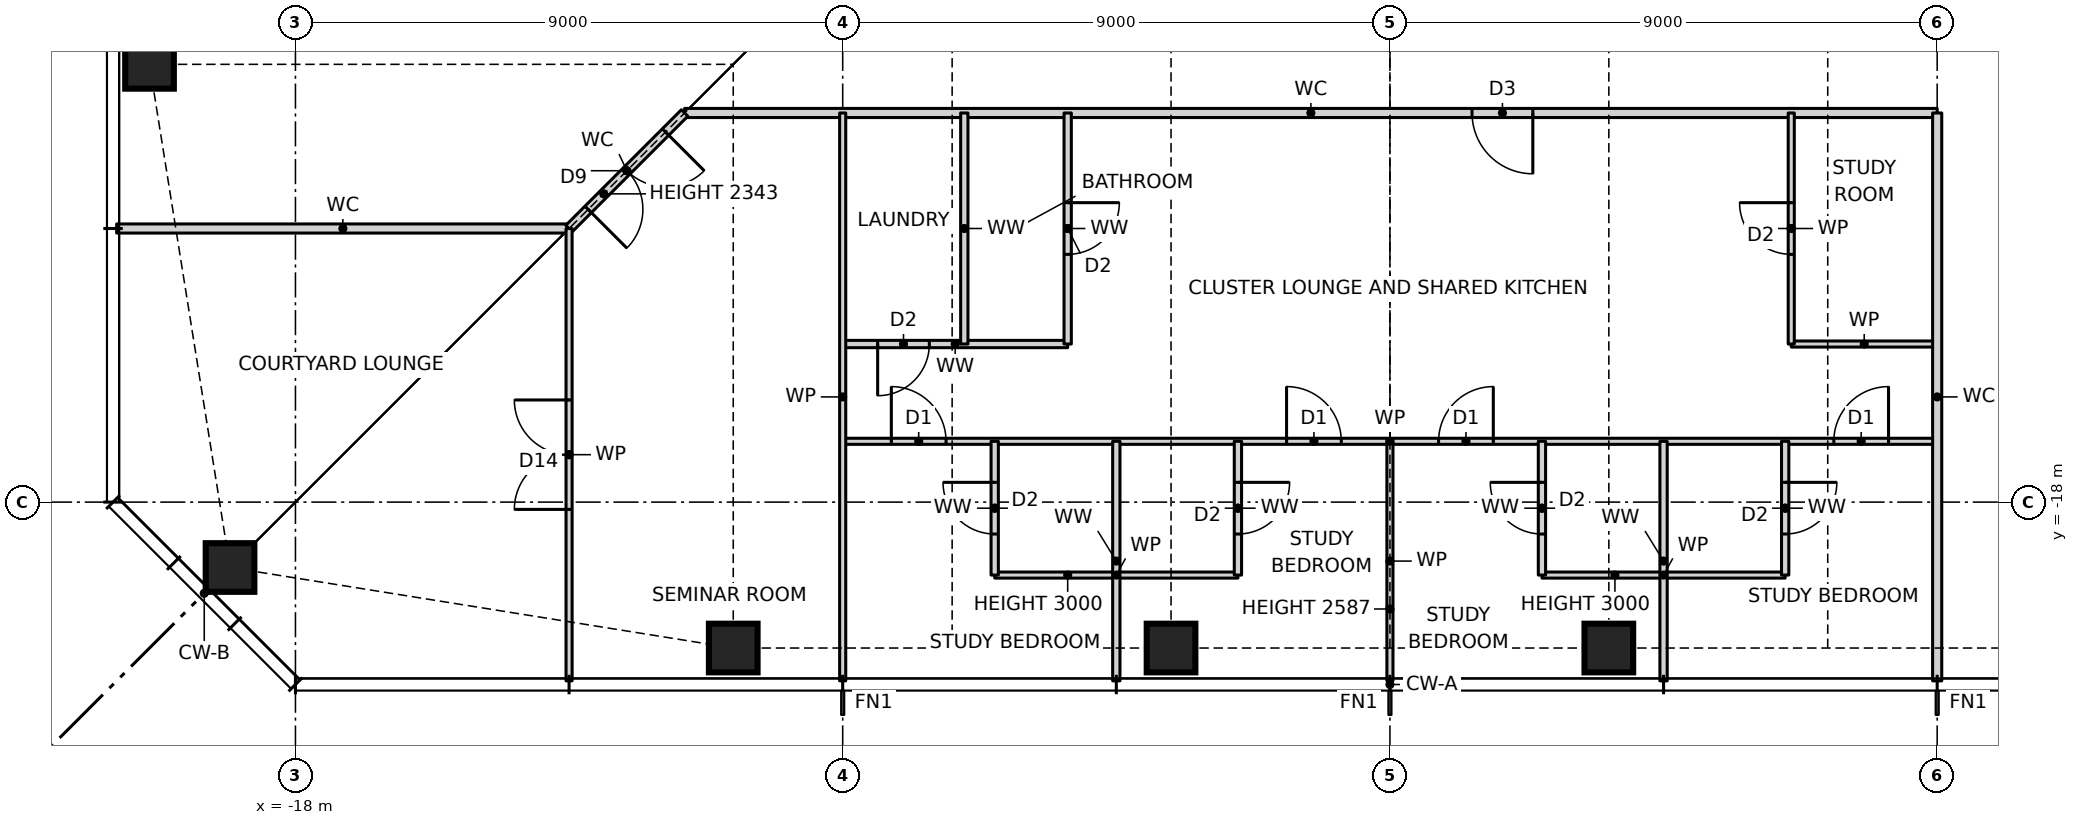
"""IFC4 building model, lengths in metres.
Left out: names, types, materials, properties, quantities, classifications, styles, units other than length and angle.
Written with IfcOpenShell. Run it as: python <this file> out.ifc"""

import sys

from ifc_helpers import new_model, si_unit, direction, frame, frame_2d, origin, origin_2d, place, context, subcontext, project, spatial, rectangle, hollow_rectangle, extrude, element, fill, save


model = new_model("IFC4")
c1 = context("Model", 3, precision=1e-05, world=origin(), true_north=direction((0.0, 1.0)))
c2 = subcontext(c1, "Body", "Model", "MODEL_VIEW")
j1 = project(units=[si_unit("LENGTHUNIT", "METRE"), si_unit("PLANEANGLEUNIT", "RADIAN")], contexts=[c1])
p1 = place(None, origin())
s1 = spatial("IfcSite", under=j1, at=p1, CompositionType="ELEMENT")
p2 = place(p1, origin())
s2 = spatial("IfcBuilding", under=s1, at=p2, CompositionType="ELEMENT")
p3 = place(p2, frame((0.0, 0.0, 98.0)))
s3 = spatial("IfcBuildingStorey", under=s2, at=p3, CompositionType="ELEMENT", Elevation=98.0)
for number, where, z_axis, x_axis in (
    (1, (-19.076, -19.076, 0.0), (0.0, 0.0, 1.0), (1.0, 0.0, 0.0)),
    (2, (-10.8, -20.4, 0.0), (0.0, 0.0, 1.0), (1.0, 0.0, 0.0)),
    (3, (-3.6, -20.4, 0.0), (0.0, 0.0, 1.0), (1.0, 0.0, 0.0)),
    (4, (3.6, -20.4, 0.0), (0.0, 0.0, 1.0), (1.0, 0.0, 0.0)),
    (5, (-20.4, -10.8, 0.0), (0.0, 0.0, 1.0), (1.0, 0.0, 0.0)),
):
    element("IfcColumn", number, at=place(p3, frame(where, z_axis=z_axis, x_axis=x_axis)), inside=s3, PredefinedType="COLUMN", context=c2, shape_type="SweptSolid", body=[
        extrude(hollow_rectangle(XDim=0.8, YDim=0.8, WallThickness=0.07, at=origin_2d()), origin(), (0.0, 0.0, 1.0), 3.5),
    ])
for number, where, z_axis, x_axis in (
    (6, (-6.5, -19.2, 0.0), (0.0, 0.0, 1.0), (1.0, 0.0, 0.0)),
    (7, (2.5, -19.2, 0.0), (0.0, 0.0, 1.0), (1.0, 0.0, 0.0)),
):
    element("IfcWall", number, at=place(p3, frame(where, z_axis=z_axis, x_axis=x_axis)), inside=s3, PredefinedType="PARTITIONING", context=c2, shape_type="SweptSolid", body=[
        extrude(rectangle(XDim=4.0, YDim=0.1, at=frame_2d((2.0, 0.0))), origin(), (0.0, 0.0, 1.0), 3.0),
    ])
p4 = place(p3, frame((-9.0, -17.0, 0.0), z_axis=(0.0, 0.0, 1.0), x_axis=(1.0, 0.0, 0.0)))
e8 = element("IfcWall", 8, at=p4, inside=s3, PredefinedType="PARTITIONING", context=c2, shape_type="SweptSolid", body=[
    extrude(rectangle(XDim=18.0, YDim=0.1, at=frame_2d((9.0, 0.0))), origin(), (0.0, 0.0, 1.0), 3.27),
])
p5 = place(p4, frame((0.8, 0.0, 0.0)))
e9 = element("IfcOpeningElement", 9, at=p5, cuts=e8, PredefinedType="OPENING", context=c2, shape_type="SweptSolid", body=[
    extrude(rectangle(XDim=0.9, YDim=2.1, at=frame_2d((0.45, 1.05))), frame((0.0, 0.06, 0.0), z_axis=(0.0, -1.0, 0.0), x_axis=(1.0, 0.0, 0.0)), (0.0, 0.0, 1.0), 0.12),
])
p6 = place(p4, frame((7.3, 0.0, 0.0)))
e10 = element("IfcOpeningElement", 10, at=p6, cuts=e8, PredefinedType="OPENING", context=c2, shape_type="SweptSolid", body=[
    extrude(rectangle(XDim=0.9, YDim=2.1, at=frame_2d((0.45, 1.05))), frame((0.0, 0.06, 0.0), z_axis=(0.0, -1.0, 0.0), x_axis=(1.0, 0.0, 0.0)), (0.0, 0.0, 1.0), 0.12),
])
p7 = place(p4, frame((9.8, 0.0, 0.0)))
e11 = element("IfcOpeningElement", 11, at=p7, cuts=e8, PredefinedType="OPENING", context=c2, shape_type="SweptSolid", body=[
    extrude(rectangle(XDim=0.9, YDim=2.1, at=frame_2d((0.45, 1.05))), frame((0.0, 0.06, 0.0), z_axis=(0.0, -1.0, 0.0), x_axis=(1.0, 0.0, 0.0)), (0.0, 0.0, 1.0), 0.12),
])
p8 = place(p4, frame((16.3, 0.0, 0.0)))
e12 = element("IfcOpeningElement", 12, at=p8, cuts=e8, PredefinedType="OPENING", context=c2, shape_type="SweptSolid", body=[
    extrude(rectangle(XDim=0.9, YDim=2.1, at=frame_2d((0.45, 1.05))), frame((0.0, 0.06, 0.0), z_axis=(0.0, -1.0, 0.0), x_axis=(1.0, 0.0, 0.0)), (0.0, 0.0, 1.0), 0.12),
])
p9 = place(p3, frame((-9.0, -15.4, 0.0), z_axis=(0.0, 0.0, 1.0), x_axis=(1.0, 0.0, 0.0)))
e13 = element("IfcWall", 13, at=p9, inside=s3, PredefinedType="PARTITIONING", context=c2, shape_type="SweptSolid", body=[
    extrude(rectangle(XDim=3.7, YDim=0.12, at=frame_2d((1.85, 0.0))), origin(), (0.0, 0.0, 1.0), 3.27),
])
p10 = place(p9, frame((0.575, 0.0, 0.0)))
e14 = element("IfcOpeningElement", 14, at=p10, cuts=e13, PredefinedType="OPENING", context=c2, shape_type="SweptSolid", body=[
    extrude(rectangle(XDim=0.85, YDim=2.1, at=frame_2d((0.425, 1.05))), frame((0.0, 0.07, 0.0), z_axis=(0.0, -1.0, 0.0), x_axis=(1.0, 0.0, 0.0)), (0.0, 0.0, 1.0), 0.14),
])
p11 = place(p3, frame((6.6, -15.4, 0.0), z_axis=(0.0, 0.0, 1.0), x_axis=(1.0, 0.0, 0.0)))
e15 = element("IfcWall", 15, at=p11, inside=s3, PredefinedType="PARTITIONING", context=c2, shape_type="SweptSolid", body=[
    extrude(rectangle(XDim=2.4, YDim=0.1, at=frame_2d((1.2, 0.0))), origin(), (0.0, 0.0, 1.0), 3.27),
])
p12 = place(p3, frame((-20.94, -13.5, 0.0), z_axis=(0.0, 0.0, 1.0), x_axis=(1.0, 0.0, 0.0)))
e16 = element("IfcWall", 16, at=p12, inside=s3, PredefinedType="PARTITIONING", context=c2, shape_type="SweptSolid", body=[
    extrude(rectangle(XDim=7.44, YDim=0.15, at=frame_2d((3.72, 0.0))), origin(), (0.0, 0.0, 1.0), 3.27),
])
p13 = place(p3, frame((-11.6, -11.6, 0.0), z_axis=(0.0, 0.0, 1.0), x_axis=(1.0, 0.0, 0.0)))
e17 = element("IfcWall", 17, at=p13, inside=s3, PredefinedType="PARTITIONING", context=c2, shape_type="SweptSolid", body=[
    extrude(rectangle(XDim=20.6, YDim=0.15, at=frame_2d((10.3, 0.0))), origin(), (0.0, 0.0, 1.0), 3.27),
])
p14 = place(p13, frame((12.95, 0.0, 0.0)))
e18 = element("IfcOpeningElement", 18, at=p14, cuts=e17, PredefinedType="OPENING", context=c2, shape_type="SweptSolid", body=[
    extrude(rectangle(XDim=1.0, YDim=2.1, at=frame_2d((0.5, 1.05))), frame((0.0, 0.085, 0.0), z_axis=(0.0, -1.0, 0.0), x_axis=(1.0, 0.0, 0.0)), (0.0, 0.0, 1.0), 0.17),
])
p15 = place(p3, frame((-13.5, -13.5, 0.0), z_axis=(0.0, 0.0, 1.0), x_axis=(0.707106781187, 0.707106781187, 0.0)))
e19 = element("IfcWall", 19, at=p15, inside=s3, PredefinedType="PARTITIONING", context=c2, shape_type="SweptSolid", body=[
    extrude(rectangle(XDim=2.687, YDim=0.15, at=frame_2d((1.343, 0.0))), origin(), (0.0, 0.0, 1.0), 2.343),
])
p16 = place(p15, frame((0.444, 0.0, 0.0)))
e20 = element("IfcOpeningElement", 20, at=p16, cuts=e19, PredefinedType="OPENING", context=c2, shape_type="SweptSolid", body=[
    extrude(rectangle(XDim=1.8, YDim=2.1, at=frame_2d((0.9, 1.05))), frame((0.0, 0.085, 0.0), z_axis=(0.0, -1.0, 0.0), x_axis=(1.0, 0.0, 0.0)), (0.0, 0.0, 1.0), 0.17),
])
p17 = place(p3, frame((9.0, -20.94, 0.0), z_axis=(0.0, 0.0, 1.0), x_axis=(0.0, 1.0, 0.0)))
e21 = element("IfcWall", 21, at=p17, inside=s3, PredefinedType="PARTITIONING", context=c2, shape_type="SweptSolid", body=[
    extrude(rectangle(XDim=9.34, YDim=0.15, at=frame_2d((4.67, 0.0))), origin(), (0.0, 0.0, 1.0), 3.27),
])
p18 = place(p3, frame((6.6, -15.4, 0.0), z_axis=(0.0, 0.0, 1.0), x_axis=(0.0, 1.0, 0.0)))
e22 = element("IfcWall", 22, at=p18, inside=s3, PredefinedType="PARTITIONING", context=c2, shape_type="SweptSolid", body=[
    extrude(rectangle(XDim=3.8, YDim=0.1, at=frame_2d((1.9, 0.0))), origin(), (0.0, 0.0, 1.0), 3.27),
])
p19 = place(p18, frame((1.475, 0.0, 0.0)))
e23 = element("IfcOpeningElement", 23, at=p19, cuts=e22, PredefinedType="OPENING", context=c2, shape_type="SweptSolid", body=[
    extrude(rectangle(XDim=0.85, YDim=2.1, at=frame_2d((0.425, 1.05))), frame((0.0, 0.06, 0.0), z_axis=(0.0, -1.0, 0.0), x_axis=(1.0, 0.0, 0.0)), (0.0, 0.0, 1.0), 0.12),
])
p20 = place(p3, frame((6.5, -19.2, 0.0), z_axis=(0.0, 0.0, 1.0), x_axis=(0.0, 1.0, 0.0)))
e24 = element("IfcWall", 24, at=p20, inside=s3, PredefinedType="PARTITIONING", context=c2, shape_type="SweptSolid", body=[
    extrude(rectangle(XDim=2.2, YDim=0.12, at=frame_2d((1.1, 0.0))), origin(), (0.0, 0.0, 1.0), 3.27),
])
p21 = place(p20, frame((0.675, 0.0, 0.0)))
e25 = element("IfcOpeningElement", 25, at=p21, cuts=e24, PredefinedType="OPENING", context=c2, shape_type="SweptSolid", body=[
    extrude(rectangle(XDim=0.85, YDim=2.1, at=frame_2d((0.425, 1.05))), frame((0.0, 0.07, 0.0), z_axis=(0.0, -1.0, 0.0), x_axis=(1.0, 0.0, 0.0)), (0.0, 0.0, 1.0), 0.14),
])
p22 = place(p3, frame((4.5, -20.94, 0.0), z_axis=(0.0, 0.0, 1.0), x_axis=(0.0, 1.0, 0.0)))
e26 = element("IfcWall", 26, at=p22, inside=s3, PredefinedType="PARTITIONING", context=c2, shape_type="SweptSolid", body=[
    extrude(rectangle(XDim=3.94, YDim=0.12, at=frame_2d((1.97, 0.0))), origin(), (0.0, 0.0, 1.0), 3.27),
])
p23 = place(p3, frame((2.5, -19.2, 0.0), z_axis=(0.0, 0.0, 1.0), x_axis=(0.0, 1.0, 0.0)))
e27 = element("IfcWall", 27, at=p23, inside=s3, PredefinedType="PARTITIONING", context=c2, shape_type="SweptSolid", body=[
    extrude(rectangle(XDim=2.2, YDim=0.12, at=frame_2d((1.1, 0.0))), origin(), (0.0, 0.0, 1.0), 3.27),
])
p24 = place(p23, frame((0.675, 0.0, 0.0)))
e28 = element("IfcOpeningElement", 28, at=p24, cuts=e27, PredefinedType="OPENING", context=c2, shape_type="SweptSolid", body=[
    extrude(rectangle(XDim=0.85, YDim=2.1, at=frame_2d((0.425, 1.05))), frame((0.0, 0.07, 0.0), z_axis=(0.0, -1.0, 0.0), x_axis=(1.0, 0.0, 0.0)), (0.0, 0.0, 1.0), 0.14),
])
p25 = place(p3, frame((0.0, -20.94, 0.0), z_axis=(0.0, 0.0, 1.0), x_axis=(0.0, 1.0, 0.0)))
e29 = element("IfcWall", 29, at=p25, inside=s3, PredefinedType="PARTITIONING", context=c2, shape_type="SweptSolid", body=[
    extrude(rectangle(XDim=3.94, YDim=0.1, at=frame_2d((1.97, 0.0))), origin(), (0.0, 0.0, 1.0), 2.587),
])
p26 = place(p3, frame((-2.5, -19.2, 0.0), z_axis=(0.0, 0.0, 1.0), x_axis=(0.0, 1.0, 0.0)))
e30 = element("IfcWall", 30, at=p26, inside=s3, PredefinedType="PARTITIONING", context=c2, shape_type="SweptSolid", body=[
    extrude(rectangle(XDim=2.2, YDim=0.12, at=frame_2d((1.1, 0.0))), origin(), (0.0, 0.0, 1.0), 3.27),
])
p27 = place(p26, frame((0.675, 0.0, 0.0)))
e31 = element("IfcOpeningElement", 31, at=p27, cuts=e30, PredefinedType="OPENING", context=c2, shape_type="SweptSolid", body=[
    extrude(rectangle(XDim=0.85, YDim=2.1, at=frame_2d((0.425, 1.05))), frame((0.0, 0.07, 0.0), z_axis=(0.0, -1.0, 0.0), x_axis=(1.0, 0.0, 0.0)), (0.0, 0.0, 1.0), 0.14),
])
p28 = place(p3, frame((-4.5, -20.94, 0.0), z_axis=(0.0, 0.0, 1.0), x_axis=(0.0, 1.0, 0.0)))
e32 = element("IfcWall", 32, at=p28, inside=s3, PredefinedType="PARTITIONING", context=c2, shape_type="SweptSolid", body=[
    extrude(rectangle(XDim=3.94, YDim=0.12, at=frame_2d((1.97, 0.0))), origin(), (0.0, 0.0, 1.0), 3.27),
])
p29 = place(p3, frame((-5.3, -15.4, 0.0), z_axis=(0.0, 0.0, 1.0), x_axis=(0.0, 1.0, 0.0)))
e33 = element("IfcWall", 33, at=p29, inside=s3, PredefinedType="PARTITIONING", context=c2, shape_type="SweptSolid", body=[
    extrude(rectangle(XDim=3.8, YDim=0.12, at=frame_2d((1.9, 0.0))), origin(), (0.0, 0.0, 1.0), 3.27),
])
p30 = place(p29, frame((1.475, 0.0, 0.0)))
e34 = element("IfcOpeningElement", 34, at=p30, cuts=e33, PredefinedType="OPENING", context=c2, shape_type="SweptSolid", body=[
    extrude(rectangle(XDim=0.85, YDim=2.1, at=frame_2d((0.425, 1.05))), frame((0.0, 0.07, 0.0), z_axis=(0.0, -1.0, 0.0), x_axis=(1.0, 0.0, 0.0)), (0.0, 0.0, 1.0), 0.14),
])
p31 = place(p3, frame((-6.5, -19.2, 0.0), z_axis=(0.0, 0.0, 1.0), x_axis=(0.0, 1.0, 0.0)))
e35 = element("IfcWall", 35, at=p31, inside=s3, PredefinedType="PARTITIONING", context=c2, shape_type="SweptSolid", body=[
    extrude(rectangle(XDim=2.2, YDim=0.12, at=frame_2d((1.1, 0.0))), origin(), (0.0, 0.0, 1.0), 3.27),
])
p32 = place(p31, frame((0.675, 0.0, 0.0)))
e36 = element("IfcOpeningElement", 36, at=p32, cuts=e35, PredefinedType="OPENING", context=c2, shape_type="SweptSolid", body=[
    extrude(rectangle(XDim=0.85, YDim=2.1, at=frame_2d((0.425, 1.05))), frame((0.0, 0.07, 0.0), z_axis=(0.0, -1.0, 0.0), x_axis=(1.0, 0.0, 0.0)), (0.0, 0.0, 1.0), 0.14),
])
p33 = place(p3, frame((-7.0, -15.4, 0.0), z_axis=(0.0, 0.0, 1.0), x_axis=(0.0, 1.0, 0.0)))
e37 = element("IfcWall", 37, at=p33, inside=s3, PredefinedType="PARTITIONING", context=c2, shape_type="SweptSolid", body=[
    extrude(rectangle(XDim=3.8, YDim=0.12, at=frame_2d((1.9, 0.0))), origin(), (0.0, 0.0, 1.0), 3.27),
])
p34 = place(p3, frame((-9.0, -20.94, 0.0), z_axis=(0.0, 0.0, 1.0), x_axis=(0.0, 1.0, 0.0)))
e38 = element("IfcWall", 38, at=p34, inside=s3, PredefinedType="PARTITIONING", context=c2, shape_type="SweptSolid", body=[
    extrude(rectangle(XDim=9.34, YDim=0.1, at=frame_2d((4.67, 0.0))), origin(), (0.0, 0.0, 1.0), 3.27),
])
p35 = place(p3, frame((-13.5, -20.94, 0.0), z_axis=(0.0, 0.0, 1.0), x_axis=(0.0, 1.0, 0.0)))
e39 = element("IfcWall", 39, at=p35, inside=s3, PredefinedType="PARTITIONING", context=c2, shape_type="SweptSolid", body=[
    extrude(rectangle(XDim=7.44, YDim=0.1, at=frame_2d((3.72, 0.0))), origin(), (0.0, 0.0, 1.0), 3.27),
])
p36 = place(p35, frame((2.82, 0.0, 0.0)))
e40 = element("IfcOpeningElement", 40, at=p36, cuts=e39, PredefinedType="OPENING", context=c2, shape_type="SweptSolid", body=[
    extrude(rectangle(XDim=1.8, YDim=2.1, at=frame_2d((0.9, 1.05))), frame((0.0, 0.06, 0.0), z_axis=(0.0, -1.0, 0.0), x_axis=(1.0, 0.0, 0.0)), (0.0, 0.0, 1.0), 0.12),
])
p37 = place(p16, frame((1.8, 0.0, 0.0), z_axis=(0.0, 0.0, 1.0), x_axis=(-1.0, 0.0, 0.0)))
e41 = element("IfcDoor", 41, at=p37, inside=s3, OperationType="DOUBLE_DOOR_SINGLE_SWING", PredefinedType="DOOR", context=c2, shape_type="SweptSolid", body=[
    extrude(rectangle(XDim=1.8, YDim=2.1, at=frame_2d((0.9, 1.05))), frame((0.0, 0.025, 0.0), z_axis=(0.0, -1.0, 0.0), x_axis=(1.0, 0.0, 0.0)), (0.0, 0.0, 1.0), 0.05),
])
fill(e20, e41)
p38 = place(p32, origin())
e42 = element("IfcDoor", 42, at=p38, inside=s3, OperationType="SINGLE_SWING_RIGHT", PredefinedType="DOOR", context=c2, shape_type="SweptSolid", body=[
    extrude(rectangle(XDim=0.85, YDim=2.1, at=frame_2d((0.425, 1.05))), frame((0.0, 0.025, 0.0), z_axis=(0.0, -1.0, 0.0), x_axis=(1.0, 0.0, 0.0)), (0.0, 0.0, 1.0), 0.05),
])
fill(e36, e42)
p39 = place(p5, origin())
e43 = element("IfcDoor", 43, at=p39, inside=s3, OperationType="SINGLE_SWING_LEFT", PredefinedType="DOOR", context=c2, shape_type="SweptSolid", body=[
    extrude(rectangle(XDim=0.9, YDim=2.1, at=frame_2d((0.45, 1.05))), frame((0.0, 0.025, 0.0), z_axis=(0.0, -1.0, 0.0), x_axis=(1.0, 0.0, 0.0)), (0.0, 0.0, 1.0), 0.05),
])
fill(e9, e43)
p40 = place(p27, frame((0.85, 0.0, 0.0), z_axis=(0.0, 0.0, 1.0), x_axis=(-1.0, 0.0, 0.0)))
e44 = element("IfcDoor", 44, at=p40, inside=s3, OperationType="SINGLE_SWING_LEFT", PredefinedType="DOOR", context=c2, shape_type="SweptSolid", body=[
    extrude(rectangle(XDim=0.85, YDim=2.1, at=frame_2d((0.425, 1.05))), frame((0.0, 0.025, 0.0), z_axis=(0.0, -1.0, 0.0), x_axis=(1.0, 0.0, 0.0)), (0.0, 0.0, 1.0), 0.05),
])
fill(e31, e44)
p41 = place(p6, origin())
e45 = element("IfcDoor", 45, at=p41, inside=s3, OperationType="SINGLE_SWING_LEFT", PredefinedType="DOOR", context=c2, shape_type="SweptSolid", body=[
    extrude(rectangle(XDim=0.9, YDim=2.1, at=frame_2d((0.45, 1.05))), frame((0.0, 0.025, 0.0), z_axis=(0.0, -1.0, 0.0), x_axis=(1.0, 0.0, 0.0)), (0.0, 0.0, 1.0), 0.05),
])
fill(e10, e45)
p42 = place(p24, origin())
e46 = element("IfcDoor", 46, at=p42, inside=s3, OperationType="SINGLE_SWING_RIGHT", PredefinedType="DOOR", context=c2, shape_type="SweptSolid", body=[
    extrude(rectangle(XDim=0.85, YDim=2.1, at=frame_2d((0.425, 1.05))), frame((0.0, 0.025, 0.0), z_axis=(0.0, -1.0, 0.0), x_axis=(1.0, 0.0, 0.0)), (0.0, 0.0, 1.0), 0.05),
])
fill(e28, e46)
p43 = place(p7, origin())
e47 = element("IfcDoor", 47, at=p43, inside=s3, OperationType="SINGLE_SWING_RIGHT", PredefinedType="DOOR", context=c2, shape_type="SweptSolid", body=[
    extrude(rectangle(XDim=0.9, YDim=2.1, at=frame_2d((0.45, 1.05))), frame((0.0, 0.025, 0.0), z_axis=(0.0, -1.0, 0.0), x_axis=(1.0, 0.0, 0.0)), (0.0, 0.0, 1.0), 0.05),
])
fill(e11, e47)
p44 = place(p21, frame((0.85, 0.0, 0.0), z_axis=(0.0, 0.0, 1.0), x_axis=(-1.0, 0.0, 0.0)))
e48 = element("IfcDoor", 48, at=p44, inside=s3, OperationType="SINGLE_SWING_LEFT", PredefinedType="DOOR", context=c2, shape_type="SweptSolid", body=[
    extrude(rectangle(XDim=0.85, YDim=2.1, at=frame_2d((0.425, 1.05))), frame((0.0, 0.025, 0.0), z_axis=(0.0, -1.0, 0.0), x_axis=(1.0, 0.0, 0.0)), (0.0, 0.0, 1.0), 0.05),
])
fill(e25, e48)
p45 = place(p8, origin())
e49 = element("IfcDoor", 49, at=p45, inside=s3, OperationType="SINGLE_SWING_RIGHT", PredefinedType="DOOR", context=c2, shape_type="SweptSolid", body=[
    extrude(rectangle(XDim=0.9, YDim=2.1, at=frame_2d((0.45, 1.05))), frame((0.0, 0.025, 0.0), z_axis=(0.0, -1.0, 0.0), x_axis=(1.0, 0.0, 0.0)), (0.0, 0.0, 1.0), 0.05),
])
fill(e12, e49)
p46 = place(p14, frame((1.0, 0.0, 0.0), z_axis=(0.0, 0.0, 1.0), x_axis=(-1.0, 0.0, 0.0)))
e50 = element("IfcDoor", 50, at=p46, inside=s3, OperationType="SINGLE_SWING_LEFT", PredefinedType="DOOR", context=c2, shape_type="SweptSolid", body=[
    extrude(rectangle(XDim=1.0, YDim=2.1, at=frame_2d((0.5, 1.05))), frame((0.0, 0.025, 0.0), z_axis=(0.0, -1.0, 0.0), x_axis=(1.0, 0.0, 0.0)), (0.0, 0.0, 1.0), 0.05),
])
fill(e18, e50)
p47 = place(p10, frame((0.85, 0.0, 0.0), z_axis=(0.0, 0.0, 1.0), x_axis=(-1.0, 0.0, 0.0)))
e51 = element("IfcDoor", 51, at=p47, inside=s3, OperationType="SINGLE_SWING_RIGHT", PredefinedType="DOOR", context=c2, shape_type="SweptSolid", body=[
    extrude(rectangle(XDim=0.85, YDim=2.1, at=frame_2d((0.425, 1.05))), frame((0.0, 0.025, 0.0), z_axis=(0.0, -1.0, 0.0), x_axis=(1.0, 0.0, 0.0)), (0.0, 0.0, 1.0), 0.05),
])
fill(e14, e51)
p48 = place(p30, frame((0.85, 0.0, 0.0), z_axis=(0.0, 0.0, 1.0), x_axis=(-1.0, 0.0, 0.0)))
e52 = element("IfcDoor", 52, at=p48, inside=s3, OperationType="SINGLE_SWING_LEFT", PredefinedType="DOOR", context=c2, shape_type="SweptSolid", body=[
    extrude(rectangle(XDim=0.85, YDim=2.1, at=frame_2d((0.425, 1.05))), frame((0.0, 0.025, 0.0), z_axis=(0.0, -1.0, 0.0), x_axis=(1.0, 0.0, 0.0)), (0.0, 0.0, 1.0), 0.05),
])
fill(e34, e52)
p49 = place(p19, origin())
e53 = element("IfcDoor", 53, at=p49, inside=s3, OperationType="SINGLE_SWING_RIGHT", PredefinedType="DOOR", context=c2, shape_type="SweptSolid", body=[
    extrude(rectangle(XDim=0.85, YDim=2.1, at=frame_2d((0.425, 1.05))), frame((0.0, 0.025, 0.0), z_axis=(0.0, -1.0, 0.0), x_axis=(1.0, 0.0, 0.0)), (0.0, 0.0, 1.0), 0.05),
])
fill(e23, e53)
p50 = place(p36, origin())
e54 = element("IfcDoor", 54, at=p50, inside=s3, OperationType="DOUBLE_DOOR_SINGLE_SWING", PredefinedType="DOOR", context=c2, shape_type="SweptSolid", body=[
    extrude(rectangle(XDim=1.8, YDim=2.1, at=frame_2d((0.9, 1.05))), frame((0.0, 0.025, 0.0), z_axis=(0.0, -1.0, 0.0), x_axis=(1.0, 0.0, 0.0)), (0.0, 0.0, 1.0), 0.05),
])
fill(e40, e54)
save(model, sys.argv[1])
